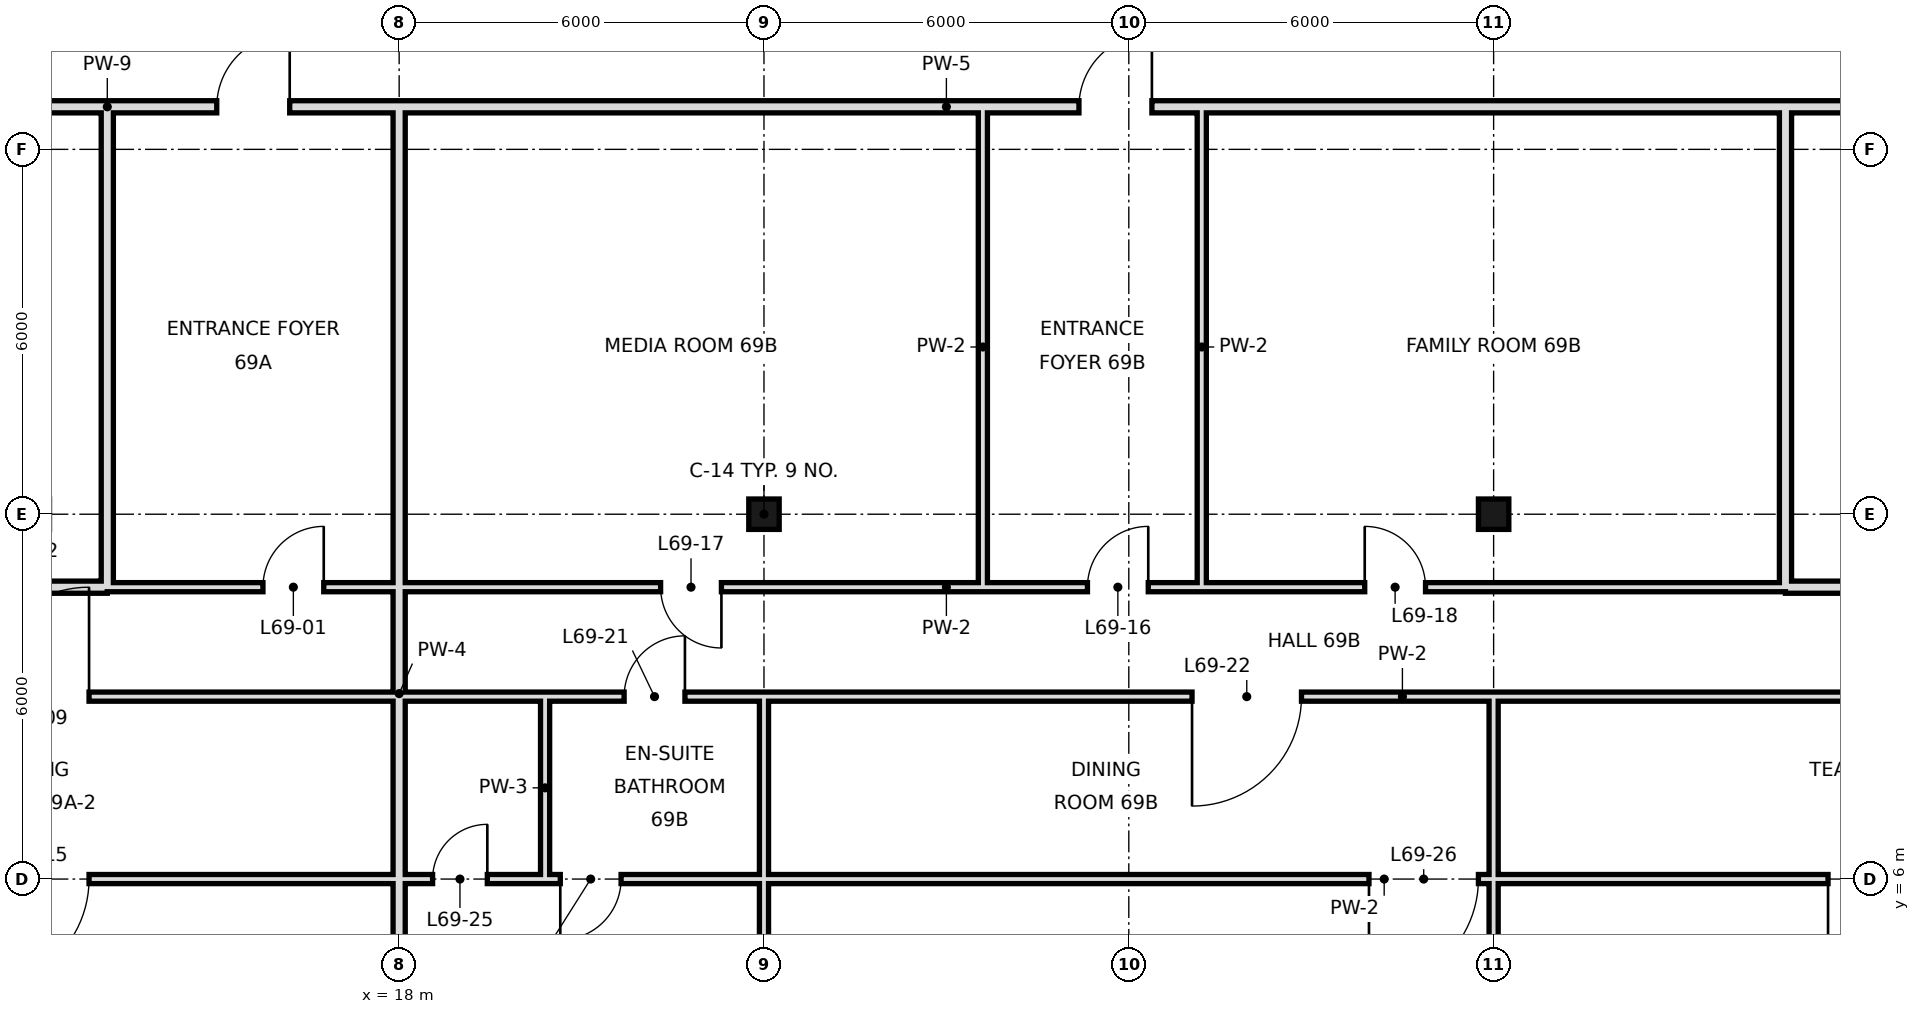
"""IFC4 building model, lengths in metres.
Left out: names, types, materials, properties, quantities, classifications, styles, units other than length and angle.
Written with IfcOpenShell. Run it as: python <this file> out.ifc"""

import sys

from ifc_helpers import new_model, si_unit, direction, frame, frame_2d, origin, origin_2d, place, context, subcontext, project, spatial, rectangle, hollow_rectangle, extrude, element, fill, save


model = new_model("IFC4")
c1 = context("Model", 3, precision=1e-05, world=origin(), true_north=direction((0.0, 1.0)))
c2 = subcontext(c1, "Body", "Model", "MODEL_VIEW")
j1 = project(units=[si_unit("LENGTHUNIT", "METRE"), si_unit("PLANEANGLEUNIT", "RADIAN")], contexts=[c1])
p1 = place(None, origin())
s1 = spatial("IfcSite", under=j1, at=p1, CompositionType="ELEMENT")
p2 = place(p1, origin())
s2 = spatial("IfcBuilding", under=s1, at=p2, CompositionType="ELEMENT")
p3 = place(p2, frame((0.0, 0.0, 294.4)))
s3 = spatial("IfcBuildingStorey", under=s2, at=p3, CompositionType="ELEMENT", Elevation=294.4)
for number, where, z_axis, x_axis in (
    (1, (24.0, 12.0, 0.0), (0.0, 0.0, 1.0), (1.0, 0.0, 0.0)),
    (2, (36.0, 12.0, 0.0), (0.0, 0.0, 1.0), (1.0, 0.0, 0.0)),
):
    element("IfcColumn", number, at=place(p3, frame(where, z_axis=z_axis, x_axis=x_axis)), inside=s3, PredefinedType="COLUMN", context=c2, shape_type="SweptSolid", body=[
        extrude(hollow_rectangle(XDim=0.5, YDim=0.5, WallThickness=0.025, at=origin_2d()), origin(), (0.0, 0.0, 1.0), 3.6),
    ])
p4 = place(p3, frame((13.2, 10.8, 0.0), z_axis=(0.0, 0.0, 1.0), x_axis=(0.0, 1.0, 0.0)))
e3 = element("IfcWall", 3, at=p4, inside=s3, PredefinedType="SOLIDWALL", context=c2, shape_type="SweptSolid", body=[
    extrude(rectangle(XDim=7.9, YDim=0.2, at=frame_2d((3.95, 0.0))), origin(), (0.0, 0.0, 1.0), 2.72),
])
p5 = place(p3, frame((18.0, -0.6, 0.0), z_axis=(0.0, 0.0, 1.0), x_axis=(0.0, 1.0, 0.0)))
e4 = element("IfcWall", 4, at=p5, inside=s3, PredefinedType="SOLIDWALL", context=c2, shape_type="SweptSolid", body=[
    extrude(rectangle(XDim=19.3, YDim=0.2, at=frame_2d((9.65, 0.0))), origin(), (0.0, 0.0, 1.0), 2.72),
])
p6 = place(p3, frame((20.4, 6.0, 0.0), z_axis=(0.0, 0.0, 1.0), x_axis=(0.0, 1.0, 0.0)))
e5 = element("IfcWall", 5, at=p6, inside=s3, PredefinedType="PARTITIONING", context=c2, shape_type="SweptSolid", body=[
    extrude(rectangle(XDim=3.0, YDim=0.15, at=frame_2d((1.5, 0.0))), origin(), (0.0, 0.0, 1.0), 3.42),
])
p7 = place(p3, frame((24.0, 0.0, 0.0), z_axis=(0.0, 0.0, 1.0), x_axis=(0.0, 1.0, 0.0)))
e6 = element("IfcWall", 6, at=p7, inside=s3, PredefinedType="PARTITIONING", context=c2, shape_type="SweptSolid", body=[
    extrude(rectangle(XDim=9.0, YDim=0.15, at=frame_2d((4.5, 0.0))), origin(), (0.0, 0.0, 1.0), 2.72),
])
for number, where, z_axis, x_axis in (
    (7, (27.6, 10.8, 0.0), (0.0, 0.0, 1.0), (0.0, 1.0, 0.0)),
    (8, (31.2, 10.8, 0.0), (0.0, 0.0, 1.0), (0.0, 1.0, 0.0)),
):
    element("IfcWall", number, at=place(p3, frame(where, z_axis=z_axis, x_axis=x_axis)), inside=s3, PredefinedType="PARTITIONING", context=c2, shape_type="SweptSolid", body=[
        extrude(rectangle(XDim=7.9, YDim=0.15, at=frame_2d((3.95, 0.0))), origin(), (0.0, 0.0, 1.0), 3.42),
    ])
p8 = place(p3, frame((36.0, 0.0, 0.0), z_axis=(0.0, 0.0, 1.0), x_axis=(0.0, 1.0, 0.0)))
e9 = element("IfcWall", 9, at=p8, inside=s3, PredefinedType="PARTITIONING", context=c2, shape_type="SweptSolid", body=[
    extrude(rectangle(XDim=9.0, YDim=0.15, at=frame_2d((4.5, 0.0))), origin(), (0.0, 0.0, 1.0), 2.72),
])
p9 = place(p3, frame((40.8, 10.8, 0.0), z_axis=(0.0, 0.0, 1.0), x_axis=(0.0, 1.0, 0.0)))
e10 = element("IfcWall", 10, at=p9, inside=s3, PredefinedType="SOLIDWALL", context=c2, shape_type="SweptSolid", body=[
    extrude(rectangle(XDim=7.9, YDim=0.2, at=frame_2d((3.95, 0.0))), origin(), (0.0, 0.0, 1.0), 2.72),
])
p10 = place(p3, frame((7.8, 10.8, 0.0), z_axis=(0.0, 0.0, 1.0), x_axis=(1.0, 0.0, 0.0)))
e11 = element("IfcWall", 11, at=p10, inside=s3, PredefinedType="SOLIDWALL", context=c2, shape_type="SweptSolid", body=[
    extrude(rectangle(XDim=5.4, YDim=0.2, at=frame_2d((2.7, 0.0))), origin(), (0.0, 0.0, 1.0), 2.72),
])
p11 = place(p10, frame((1.42, 0.0, 0.0)))
e12 = element("IfcOpeningElement", 12, at=p11, cuts=e11, PredefinedType="OPENING", context=c2, shape_type="SweptSolid", body=[
    extrude(rectangle(XDim=1.0, YDim=2.4, at=frame_2d((0.5, 1.2))), frame((0.0, 0.11, 0.0), z_axis=(0.0, -1.0, 0.0), x_axis=(1.0, 0.0, 0.0)), (0.0, 0.0, 1.0), 0.22),
])
p12 = place(p3, frame((40.8, 10.8, 0.0), z_axis=(0.0, 0.0, 1.0), x_axis=(1.0, 0.0, 0.0)))
e13 = element("IfcWall", 13, at=p12, inside=s3, PredefinedType="SOLIDWALL", context=c2, shape_type="SweptSolid", body=[
    extrude(rectangle(XDim=4.8, YDim=0.2, at=frame_2d((2.4, 0.0))), origin(), (0.0, 0.0, 1.0), 2.72),
])
p13 = place(p12, frame((1.9, 0.0, 0.0)))
e14 = element("IfcOpeningElement", 14, at=p13, cuts=e13, PredefinedType="OPENING", context=c2, shape_type="SweptSolid", body=[
    extrude(rectangle(XDim=1.0, YDim=2.4, at=frame_2d((0.5, 1.2))), frame((0.0, 0.11, 0.0), z_axis=(0.0, -1.0, 0.0), x_axis=(1.0, 0.0, 0.0)), (0.0, 0.0, 1.0), 0.22),
])
p14 = place(p3, frame((13.2, 10.8, 0.0), z_axis=(0.0, 0.0, 1.0), x_axis=(1.0, 0.0, 0.0)))
e15 = element("IfcWall", 15, at=p14, inside=s3, PredefinedType="PARTITIONING", context=c2, shape_type="SweptSolid", body=[
    extrude(rectangle(XDim=27.6, YDim=0.15, at=frame_2d((13.8, 0.0))), origin(), (0.0, 0.0, 1.0), 3.42),
])
p15 = place(p14, frame((2.56, 0.0, 0.0)))
e16 = element("IfcOpeningElement", 16, at=p15, cuts=e15, PredefinedType="OPENING", context=c2, shape_type="SweptSolid", body=[
    extrude(rectangle(XDim=1.0, YDim=2.4, at=frame_2d((0.5, 1.2))), frame((0.0, 0.085, 0.0), z_axis=(0.0, -1.0, 0.0), x_axis=(1.0, 0.0, 0.0)), (0.0, 0.0, 1.0), 0.17),
])
p16 = place(p14, frame((16.12, 0.0, 0.0)))
e17 = element("IfcOpeningElement", 17, at=p16, cuts=e15, PredefinedType="OPENING", context=c2, shape_type="SweptSolid", body=[
    extrude(rectangle(XDim=1.0, YDim=2.4, at=frame_2d((0.5, 1.2))), frame((0.0, 0.085, 0.0), z_axis=(0.0, -1.0, 0.0), x_axis=(1.0, 0.0, 0.0)), (0.0, 0.0, 1.0), 0.17),
])
p17 = place(p14, frame((9.1, 0.0, 0.0)))
e18 = element("IfcOpeningElement", 18, at=p17, cuts=e15, PredefinedType="OPENING", context=c2, shape_type="SweptSolid", body=[
    extrude(rectangle(XDim=1.0, YDim=2.4, at=frame_2d((0.5, 1.2))), frame((0.0, 0.085, 0.0), z_axis=(0.0, -1.0, 0.0), x_axis=(1.0, 0.0, 0.0)), (0.0, 0.0, 1.0), 0.17),
])
p18 = place(p14, frame((20.68, 0.0, 0.0)))
e19 = element("IfcOpeningElement", 19, at=p18, cuts=e15, PredefinedType="OPENING", context=c2, shape_type="SweptSolid", body=[
    extrude(rectangle(XDim=1.0, YDim=2.4, at=frame_2d((0.5, 1.2))), frame((0.0, 0.085, 0.0), z_axis=(0.0, -1.0, 0.0), x_axis=(1.0, 0.0, 0.0)), (0.0, 0.0, 1.0), 0.17),
])
p19 = place(p3, frame((13.2, 18.7, 0.0), z_axis=(0.0, 0.0, 1.0), x_axis=(1.0, 0.0, 0.0)))
e20 = element("IfcWall", 20, at=p19, inside=s3, PredefinedType="SOLIDWALL", context=c2, shape_type="SweptSolid", body=[
    extrude(rectangle(XDim=27.6, YDim=0.2, at=frame_2d((13.8, 0.0))), origin(), (0.0, 0.0, 1.0), 2.72),
])
p20 = place(p19, frame((1.8, 0.0, 0.0)))
e21 = element("IfcOpeningElement", 21, at=p20, cuts=e20, PredefinedType="OPENING", context=c2, shape_type="SweptSolid", body=[
    extrude(rectangle(XDim=1.2, YDim=2.4, at=frame_2d((0.6, 1.2))), frame((0.0, 0.11, 0.0), z_axis=(0.0, -1.0, 0.0), x_axis=(1.0, 0.0, 0.0)), (0.0, 0.0, 1.0), 0.22),
])
p21 = place(p19, frame((15.98, 0.0, 0.0)))
e22 = element("IfcOpeningElement", 22, at=p21, cuts=e20, PredefinedType="OPENING", context=c2, shape_type="SweptSolid", body=[
    extrude(rectangle(XDim=1.2, YDim=2.4, at=frame_2d((0.6, 1.2))), frame((0.0, 0.11, 0.0), z_axis=(0.0, -1.0, 0.0), x_axis=(1.0, 0.0, 0.0)), (0.0, 0.0, 1.0), 0.22),
])
p22 = place(p3, frame((7.8, 18.7, 0.0), z_axis=(0.0, 0.0, 1.0), x_axis=(1.0, 0.0, 0.0)))
e23 = element("IfcWall", 23, at=p22, inside=s3, PredefinedType="SOLIDWALL", context=c2, shape_type="SweptSolid", body=[
    extrude(rectangle(XDim=5.4, YDim=0.2, at=frame_2d((2.7, 0.0))), origin(), (0.0, 0.0, 1.0), 3.42),
])
p23 = place(p3, frame((40.8, 18.7, 0.0), z_axis=(0.0, 0.0, 1.0), x_axis=(1.0, 0.0, 0.0)))
e24 = element("IfcWall", 24, at=p23, inside=s3, PredefinedType="SOLIDWALL", context=c2, shape_type="SweptSolid", body=[
    extrude(rectangle(XDim=4.1, YDim=0.2, at=frame_2d((2.05, 0.0))), origin(), (0.0, 0.0, 1.0), 2.72),
])
p24 = place(p3, frame((6.0, 6.0, 0.0), z_axis=(0.0, 0.0, 1.0), x_axis=(1.0, 0.0, 0.0)))
e25 = element("IfcWall", 25, at=p24, inside=s3, PredefinedType="PARTITIONING", context=c2, shape_type="SweptSolid", body=[
    extrude(rectangle(XDim=12.0, YDim=0.15, at=frame_2d((6.0, 0.0))), origin(), (0.0, 0.0, 1.0), 2.72),
])
p25 = place(p24, frame((5.1, 0.0, 0.0)))
e26 = element("IfcOpeningElement", 26, at=p25, cuts=e25, PredefinedType="OPENING", context=c2, shape_type="SweptSolid", body=[
    extrude(rectangle(XDim=1.8, YDim=2.4, at=frame_2d((0.9, 1.2))), frame((0.0, 0.085, 0.0), z_axis=(0.0, -1.0, 0.0), x_axis=(1.0, 0.0, 0.0)), (0.0, 0.0, 1.0), 0.17),
])
p26 = place(p3, frame((20.4, 6.0, 0.0), z_axis=(0.0, 0.0, 1.0), x_axis=(1.0, 0.0, 0.0)))
e27 = element("IfcWall", 27, at=p26, inside=s3, PredefinedType="PARTITIONING", context=c2, shape_type="SweptSolid", body=[
    extrude(rectangle(XDim=27.6, YDim=0.15, at=frame_2d((13.8, 0.0))), origin(), (0.0, 0.0, 1.0), 2.72),
])
p27 = place(p26, frame((0.25, 0.0, 0.0)))
e28 = element("IfcOpeningElement", 28, at=p27, cuts=e27, PredefinedType="OPENING", context=c2, shape_type="SweptSolid", body=[
    extrude(rectangle(XDim=1.0, YDim=2.4, at=frame_2d((0.5, 1.2))), frame((0.0, 0.085, 0.0), z_axis=(0.0, -1.0, 0.0), x_axis=(1.0, 0.0, 0.0)), (0.0, 0.0, 1.0), 0.17),
])
p28 = place(p26, frame((13.55, 0.0, 0.0)))
e29 = element("IfcOpeningElement", 29, at=p28, cuts=e27, PredefinedType="OPENING", context=c2, shape_type="SweptSolid", body=[
    extrude(rectangle(XDim=1.8, YDim=2.4, at=frame_2d((0.9, 1.2))), frame((0.0, 0.085, 0.0), z_axis=(0.0, -1.0, 0.0), x_axis=(1.0, 0.0, 0.0)), (0.0, 0.0, 1.0), 0.17),
])
p29 = place(p26, frame((21.1, 0.0, 0.0)))
e30 = element("IfcOpeningElement", 30, at=p29, cuts=e27, PredefinedType="OPENING", context=c2, shape_type="SweptSolid", body=[
    extrude(rectangle(XDim=1.0, YDim=2.4, at=frame_2d((0.5, 1.2))), frame((0.0, 0.085, 0.0), z_axis=(0.0, -1.0, 0.0), x_axis=(1.0, 0.0, 0.0)), (0.0, 0.0, 1.0), 0.17),
])
p30 = place(p3, frame((18.0, 6.0, 0.0), z_axis=(0.0, 0.0, 1.0), x_axis=(1.0, 0.0, 0.0)))
e31 = element("IfcWall", 31, at=p30, inside=s3, PredefinedType="PARTITIONING", context=c2, shape_type="SweptSolid", body=[
    extrude(rectangle(XDim=2.4, YDim=0.15, at=frame_2d((1.2, 0.0))), origin(), (0.0, 0.0, 1.0), 2.72),
])
p31 = place(p30, frame((0.55, 0.0, 0.0)))
e32 = element("IfcOpeningElement", 32, at=p31, cuts=e31, PredefinedType="OPENING", context=c2, shape_type="SweptSolid", body=[
    extrude(rectangle(XDim=0.9, YDim=2.4, at=frame_2d((0.45, 1.2))), frame((0.0, 0.085, 0.0), z_axis=(0.0, -1.0, 0.0), x_axis=(1.0, 0.0, 0.0)), (0.0, 0.0, 1.0), 0.17),
])
p32 = place(p3, frame((6.0, 9.0, 0.0), z_axis=(0.0, 0.0, 1.0), x_axis=(1.0, 0.0, 0.0)))
e33 = element("IfcWall", 33, at=p32, inside=s3, PredefinedType="PARTITIONING", context=c2, shape_type="SweptSolid", body=[
    extrude(rectangle(XDim=12.0, YDim=0.15, at=frame_2d((6.0, 0.0))), origin(), (0.0, 0.0, 1.0), 3.42),
])
p33 = place(p32, frame((5.1, 0.0, 0.0)))
e34 = element("IfcOpeningElement", 34, at=p33, cuts=e33, PredefinedType="OPENING", context=c2, shape_type="SweptSolid", body=[
    extrude(rectangle(XDim=1.8, YDim=2.4, at=frame_2d((0.9, 1.2))), frame((0.0, 0.085, 0.0), z_axis=(0.0, -1.0, 0.0), x_axis=(1.0, 0.0, 0.0)), (0.0, 0.0, 1.0), 0.17),
])
p34 = place(p3, frame((20.4, 9.0, 0.0), z_axis=(0.0, 0.0, 1.0), x_axis=(1.0, 0.0, 0.0)))
e35 = element("IfcWall", 35, at=p34, inside=s3, PredefinedType="PARTITIONING", context=c2, shape_type="SweptSolid", body=[
    extrude(rectangle(XDim=28.2, YDim=0.15, at=frame_2d((14.1, 0.0))), origin(), (0.0, 0.0, 1.0), 3.42),
])
p35 = place(p34, frame((1.3, 0.0, 0.0)))
e36 = element("IfcOpeningElement", 36, at=p35, cuts=e35, PredefinedType="OPENING", context=c2, shape_type="SweptSolid", body=[
    extrude(rectangle(XDim=1.0, YDim=2.4, at=frame_2d((0.5, 1.2))), frame((0.0, 0.085, 0.0), z_axis=(0.0, -1.0, 0.0), x_axis=(1.0, 0.0, 0.0)), (0.0, 0.0, 1.0), 0.17),
])
p36 = place(p34, frame((10.64, 0.0, 0.0)))
e37 = element("IfcOpeningElement", 37, at=p36, cuts=e35, PredefinedType="OPENING", context=c2, shape_type="SweptSolid", body=[
    extrude(rectangle(XDim=1.8, YDim=2.4, at=frame_2d((0.9, 1.2))), frame((0.0, 0.085, 0.0), z_axis=(0.0, -1.0, 0.0), x_axis=(1.0, 0.0, 0.0)), (0.0, 0.0, 1.0), 0.17),
])
p37 = place(p34, frame((23.2, 0.0, 0.0)))
e38 = element("IfcOpeningElement", 38, at=p37, cuts=e35, PredefinedType="OPENING", context=c2, shape_type="SweptSolid", body=[
    extrude(rectangle(XDim=1.0, YDim=2.4, at=frame_2d((0.5, 1.2))), frame((0.0, 0.085, 0.0), z_axis=(0.0, -1.0, 0.0), x_axis=(1.0, 0.0, 0.0)), (0.0, 0.0, 1.0), 0.17),
])
p38 = place(p3, frame((18.0, 9.0, 0.0), z_axis=(0.0, 0.0, 1.0), x_axis=(1.0, 0.0, 0.0)))
e39 = element("IfcWall", 39, at=p38, inside=s3, PredefinedType="PARTITIONING", context=c2, shape_type="SweptSolid", body=[
    extrude(rectangle(XDim=2.4, YDim=0.15, at=frame_2d((1.2, 0.0))), origin(), (0.0, 0.0, 1.0), 3.42),
])
p39 = place(p15, frame((1.0, 0.0, 0.0), z_axis=(0.0, 0.0, 1.0), x_axis=(-1.0, 0.0, 0.0)))
e40 = element("IfcDoor", 40, at=p39, inside=s3, OperationType="SINGLE_SWING_LEFT", PredefinedType="DOOR", context=c2, shape_type="SweptSolid", body=[
    extrude(rectangle(XDim=1.0, YDim=2.4, at=frame_2d((0.5, 1.2))), frame((0.0, 0.025, 0.0), z_axis=(0.0, -1.0, 0.0), x_axis=(1.0, 0.0, 0.0)), (0.0, 0.0, 1.0), 0.05),
])
fill(e16, e40)
p40 = place(p33, frame((1.8, 0.0, 0.0), z_axis=(0.0, 0.0, 1.0), x_axis=(-1.0, 0.0, 0.0)))
e41 = element("IfcDoor", 41, at=p40, inside=s3, OperationType="SINGLE_SWING_LEFT", PredefinedType="DOOR", context=c2, shape_type="SweptSolid", body=[
    extrude(rectangle(XDim=1.8, YDim=2.4, at=frame_2d((0.9, 1.2))), frame((0.0, 0.025, 0.0), z_axis=(0.0, -1.0, 0.0), x_axis=(1.0, 0.0, 0.0)), (0.0, 0.0, 1.0), 0.05),
])
fill(e34, e41)
p41 = place(p25, frame((1.8, 0.0, 0.0), z_axis=(0.0, 0.0, 1.0), x_axis=(-1.0, 0.0, 0.0)))
e42 = element("IfcDoor", 42, at=p41, inside=s3, OperationType="SINGLE_SWING_RIGHT", PredefinedType="DOOR", context=c2, shape_type="SweptSolid", body=[
    extrude(rectangle(XDim=1.8, YDim=2.4, at=frame_2d((0.9, 1.2))), frame((0.0, 0.025, 0.0), z_axis=(0.0, -1.0, 0.0), x_axis=(1.0, 0.0, 0.0)), (0.0, 0.0, 1.0), 0.05),
])
fill(e26, e42)
p42 = place(p16, frame((1.0, 0.0, 0.0), z_axis=(0.0, 0.0, 1.0), x_axis=(-1.0, 0.0, 0.0)))
e43 = element("IfcDoor", 43, at=p42, inside=s3, OperationType="SINGLE_SWING_LEFT", PredefinedType="DOOR", context=c2, shape_type="SweptSolid", body=[
    extrude(rectangle(XDim=1.0, YDim=2.4, at=frame_2d((0.5, 1.2))), frame((0.0, 0.025, 0.0), z_axis=(0.0, -1.0, 0.0), x_axis=(1.0, 0.0, 0.0)), (0.0, 0.0, 1.0), 0.05),
])
fill(e17, e43)
p43 = place(p17, origin())
e44 = element("IfcDoor", 44, at=p43, inside=s3, OperationType="SINGLE_SWING_RIGHT", PredefinedType="DOOR", context=c2, shape_type="SweptSolid", body=[
    extrude(rectangle(XDim=1.0, YDim=2.4, at=frame_2d((0.5, 1.2))), frame((0.0, 0.025, 0.0), z_axis=(0.0, -1.0, 0.0), x_axis=(1.0, 0.0, 0.0)), (0.0, 0.0, 1.0), 0.05),
])
fill(e18, e44)
p44 = place(p18, origin())
e45 = element("IfcDoor", 45, at=p44, inside=s3, OperationType="SINGLE_SWING_LEFT", PredefinedType="DOOR", context=c2, shape_type="SweptSolid", body=[
    extrude(rectangle(XDim=1.0, YDim=2.4, at=frame_2d((0.5, 1.2))), frame((0.0, 0.025, 0.0), z_axis=(0.0, -1.0, 0.0), x_axis=(1.0, 0.0, 0.0)), (0.0, 0.0, 1.0), 0.05),
])
fill(e19, e45)
p45 = place(p35, frame((1.0, 0.0, 0.0), z_axis=(0.0, 0.0, 1.0), x_axis=(-1.0, 0.0, 0.0)))
e46 = element("IfcDoor", 46, at=p45, inside=s3, OperationType="SINGLE_SWING_LEFT", PredefinedType="DOOR", context=c2, shape_type="SweptSolid", body=[
    extrude(rectangle(XDim=1.0, YDim=2.4, at=frame_2d((0.5, 1.2))), frame((0.0, 0.025, 0.0), z_axis=(0.0, -1.0, 0.0), x_axis=(1.0, 0.0, 0.0)), (0.0, 0.0, 1.0), 0.05),
])
fill(e36, e46)
p46 = place(p36, frame((1.8, 0.0, 0.0), z_axis=(0.0, 0.0, 1.0), x_axis=(-1.0, 0.0, 0.0)))
e47 = element("IfcDoor", 47, at=p46, inside=s3, OperationType="SINGLE_SWING_RIGHT", PredefinedType="DOOR", context=c2, shape_type="SweptSolid", body=[
    extrude(rectangle(XDim=1.8, YDim=2.4, at=frame_2d((0.9, 1.2))), frame((0.0, 0.025, 0.0), z_axis=(0.0, -1.0, 0.0), x_axis=(1.0, 0.0, 0.0)), (0.0, 0.0, 1.0), 0.05),
])
fill(e37, e47)
p47 = place(p27, frame((1.0, 0.0, 0.0), z_axis=(0.0, 0.0, 1.0), x_axis=(-1.0, 0.0, 0.0)))
e48 = element("IfcDoor", 48, at=p47, inside=s3, OperationType="SINGLE_SWING_RIGHT", PredefinedType="DOOR", context=c2, shape_type="SweptSolid", body=[
    extrude(rectangle(XDim=1.0, YDim=2.4, at=frame_2d((0.5, 1.2))), frame((0.0, 0.025, 0.0), z_axis=(0.0, -1.0, 0.0), x_axis=(1.0, 0.0, 0.0)), (0.0, 0.0, 1.0), 0.05),
])
fill(e28, e48)
p48 = place(p31, frame((0.9, 0.0, 0.0), z_axis=(0.0, 0.0, 1.0), x_axis=(-1.0, 0.0, 0.0)))
e49 = element("IfcDoor", 49, at=p48, inside=s3, OperationType="SINGLE_SWING_LEFT", PredefinedType="DOOR", context=c2, shape_type="SweptSolid", body=[
    extrude(rectangle(XDim=0.9, YDim=2.4, at=frame_2d((0.45, 1.2))), frame((0.0, 0.025, 0.0), z_axis=(0.0, -1.0, 0.0), x_axis=(1.0, 0.0, 0.0)), (0.0, 0.0, 1.0), 0.05),
])
fill(e32, e49)
p49 = place(p28, frame((1.8, 0.0, 0.0), z_axis=(0.0, 0.0, 1.0), x_axis=(-1.0, 0.0, 0.0)))
e50 = element("IfcDoor", 50, at=p49, inside=s3, OperationType="SINGLE_SWING_RIGHT", PredefinedType="DOOR", context=c2, shape_type="SweptSolid", body=[
    extrude(rectangle(XDim=1.8, YDim=2.4, at=frame_2d((0.9, 1.2))), frame((0.0, 0.025, 0.0), z_axis=(0.0, -1.0, 0.0), x_axis=(1.0, 0.0, 0.0)), (0.0, 0.0, 1.0), 0.05),
])
fill(e29, e50)
p50 = place(p29, frame((1.0, 0.0, 0.0), z_axis=(0.0, 0.0, 1.0), x_axis=(-1.0, 0.0, 0.0)))
e51 = element("IfcDoor", 51, at=p50, inside=s3, OperationType="SINGLE_SWING_RIGHT", PredefinedType="DOOR", context=c2, shape_type="SweptSolid", body=[
    extrude(rectangle(XDim=1.0, YDim=2.4, at=frame_2d((0.5, 1.2))), frame((0.0, 0.025, 0.0), z_axis=(0.0, -1.0, 0.0), x_axis=(1.0, 0.0, 0.0)), (0.0, 0.0, 1.0), 0.05),
])
fill(e30, e51)
p51 = place(p20, frame((1.2, 0.0, 0.0), z_axis=(0.0, 0.0, 1.0), x_axis=(-1.0, 0.0, 0.0)))
e52 = element("IfcDoor", 52, at=p51, inside=s3, OperationType="SINGLE_SWING_LEFT", PredefinedType="DOOR", context=c2, shape_type="SweptSolid", body=[
    extrude(rectangle(XDim=1.2, YDim=2.4, at=frame_2d((0.6, 1.2))), frame((0.0, 0.025, 0.0), z_axis=(0.0, -1.0, 0.0), x_axis=(1.0, 0.0, 0.0)), (0.0, 0.0, 1.0), 0.05),
])
fill(e21, e52)
p52 = place(p21, frame((1.2, 0.0, 0.0), z_axis=(0.0, 0.0, 1.0), x_axis=(-1.0, 0.0, 0.0)))
e53 = element("IfcDoor", 53, at=p52, inside=s3, OperationType="SINGLE_SWING_LEFT", PredefinedType="DOOR", context=c2, shape_type="SweptSolid", body=[
    extrude(rectangle(XDim=1.2, YDim=2.4, at=frame_2d((0.6, 1.2))), frame((0.0, 0.025, 0.0), z_axis=(0.0, -1.0, 0.0), x_axis=(1.0, 0.0, 0.0)), (0.0, 0.0, 1.0), 0.05),
])
fill(e22, e53)
save(model, sys.argv[1])
